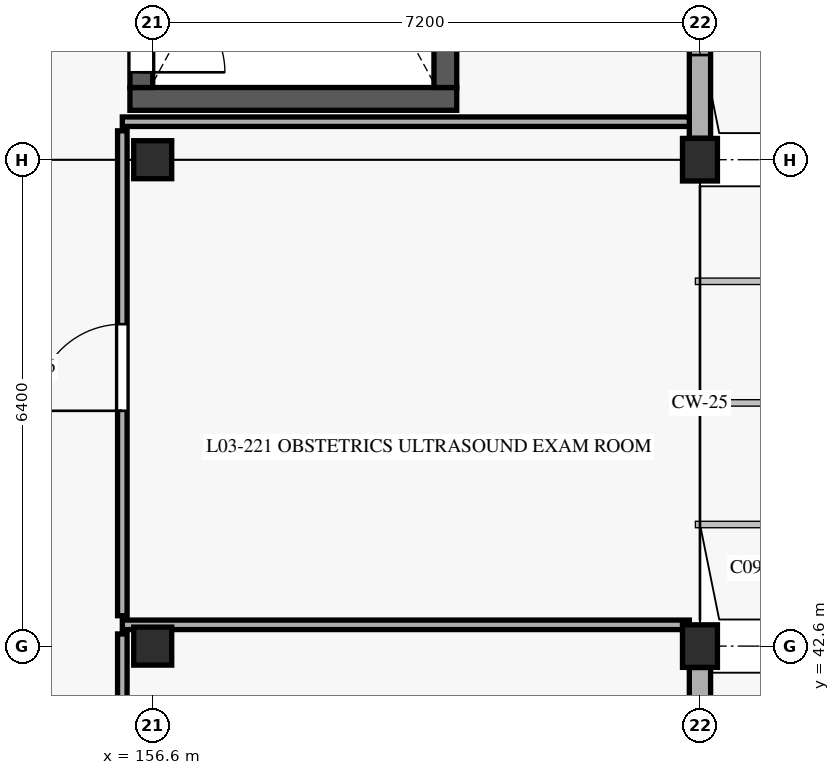
"""IFC4 building model, lengths in metres.
Left out: names, types, materials, properties, quantities, classifications, styles, units other than length and angle.
Written with IfcOpenShell. Run it as: python <this file> out.ifc"""

import sys

from ifc_helpers import new_model, si_unit, direction, frame, frame_2d, origin, origin_with_axes, origin_2d, place, context, subcontext, project, spatial, rectangle, extrude, element, fill, save


model = new_model("IFC4")
c1 = context("Model", 3, precision=1e-05, world=origin(), true_north=direction((0.0, 1.0)))
c2 = subcontext(c1, "Body", "Model", "MODEL_VIEW")
j1 = project(units=[si_unit("LENGTHUNIT", "METRE"), si_unit("PLANEANGLEUNIT", "RADIAN")], contexts=[c1])
p1 = place(None, origin())
s1 = spatial("IfcSite", under=j1, at=p1, CompositionType="ELEMENT")
p2 = place(p1, origin())
s2 = spatial("IfcBuilding", under=s1, at=p2, CompositionType="ELEMENT")
p3 = place(p2, frame((0.0, 0.0, 9.3)))
s3 = spatial("IfcBuildingStorey", under=s2, at=p3, CompositionType="ELEMENT", Elevation=9.3)
for number, where, z_axis, x_axis in (
    (1, (156.6, 42.6, 0.0), (0.0, 0.0, 1.0), (1.0, 0.0, 0.0)),
    (2, (156.6, 49.0, 0.0), (0.0, 0.0, 1.0), (1.0, 0.0, 0.0)),
):
    element("IfcColumn", number, at=place(p3, frame(where, z_axis=z_axis, x_axis=x_axis)), inside=s3, PredefinedType="COLUMN", context=c2, shape_type="SweptSolid", body=[
        extrude(rectangle(XDim=0.5, YDim=0.5, at=origin_2d()), origin(), (0.0, 0.0, 1.0), 4.2),
    ])
for number, where, z_axis, x_axis in (
    (3, (163.8, 42.6, 0.0), (0.0, 0.0, 1.0), (1.0, 0.0, 0.0)),
    (4, (163.8, 49.0, 0.0), (0.0, 0.0, 1.0), (1.0, 0.0, 0.0)),
):
    element("IfcColumn", number, at=place(p3, frame(where, z_axis=z_axis, x_axis=x_axis)), inside=s3, PredefinedType="COLUMN", context=c2, shape_type="SweptSolid", body=[
        extrude(rectangle(XDim=0.46, YDim=0.56, at=origin_2d()), origin(), (0.0, 0.0, 1.0), 4.2),
    ])
p4 = place(p3, frame((156.3, 49.8, 0.0), z_axis=(0.0, 0.0, 1.0), x_axis=(1.0, 0.0, 0.0)))
e5 = element("IfcWall", 5, at=p4, inside=s3, PredefinedType="SHEAR", context=c2, shape_type="SweptSolid", body=[
    extrude(rectangle(XDim=4.3, YDim=0.3, at=frame_2d((2.15, 0.0))), origin(), (0.0, 0.0, 1.0), 3.9),
])
p5 = place(p3, frame((156.45, 63.45, 0.0), z_axis=(0.0, 0.0, 1.0), x_axis=(0.0, -1.0, 0.0)))
e6 = element("IfcWall", 6, at=p5, inside=s3, PredefinedType="SHEAR", context=c2, shape_type="SweptSolid", body=[
    extrude(rectangle(XDim=13.5, YDim=0.3, at=frame_2d((6.75, 0.0))), origin(), (0.0, 0.0, 1.0), 3.9),
])
p6 = place(p5, frame((12.2, 0.0, 0.0)))
e7 = element("IfcOpeningElement", 7, at=p6, cuts=e6, PredefinedType="OPENING", context=c2, shape_type="SweptSolid", body=[
    extrude(rectangle(XDim=1.1, YDim=2.2, at=frame_2d((0.55, 1.1))), frame((0.0, 0.16, 0.0), z_axis=(0.0, -1.0, 0.0), x_axis=(1.0, 0.0, 0.0)), (0.0, 0.0, 1.0), 0.32),
])
p7 = place(p5, frame((4.475, 0.0, 0.0)))
e8 = element("IfcOpeningElement", 8, at=p7, cuts=e6, PredefinedType="OPENING", context=c2, shape_type="SweptSolid", body=[
    extrude(rectangle(XDim=1.15, YDim=2.2, at=frame_2d((0.575, 1.1))), frame((0.0, 0.16, 0.0), z_axis=(0.0, -1.0, 0.0), x_axis=(1.0, 0.0, 0.0)), (0.0, 0.0, 1.0), 0.32),
])
p8 = place(p5, frame((2.34, 0.0, 0.0)))
e9 = element("IfcOpeningElement", 9, at=p8, cuts=e6, PredefinedType="OPENING", context=c2, shape_type="SweptSolid", body=[
    extrude(rectangle(XDim=1.02, YDim=2.15, at=frame_2d((0.51, 1.075))), frame((0.0, 0.16, 0.0), z_axis=(0.0, -1.0, 0.0), x_axis=(1.0, 0.0, 0.0)), (0.0, 0.0, 1.0), 0.32),
])
p9 = place(p5, frame((0.44, 0.0, 0.0)))
e10 = element("IfcOpeningElement", 10, at=p9, cuts=e6, PredefinedType="OPENING", context=c2, shape_type="SweptSolid", body=[
    extrude(rectangle(XDim=1.02, YDim=2.15, at=frame_2d((0.51, 1.075))), frame((0.0, 0.16, 0.0), z_axis=(0.0, -1.0, 0.0), x_axis=(1.0, 0.0, 0.0)), (0.0, 0.0, 1.0), 0.32),
])
p10 = place(p3, frame((160.45, 49.95, 0.0), z_axis=(0.0, 0.0, 1.0), x_axis=(0.0, 1.0, 0.0)))
e11 = element("IfcWall", 11, at=p10, inside=s3, PredefinedType="SHEAR", context=c2, shape_type="SweptSolid", body=[
    extrude(rectangle(XDim=13.5, YDim=0.3, at=frame_2d((6.75, 0.0))), origin(), (0.0, 0.0, 1.0), 3.9),
])
p11 = place(p3, frame((163.8, 36.482, 0.0), z_axis=(0.0, 0.0, 1.0), x_axis=(0.0, 1.0, 0.0)))
e12 = element("IfcWall", 12, at=p11, inside=s3, PredefinedType="SOLIDWALL", context=c2, shape_type="SweptSolid", body=[
    extrude(rectangle(XDim=5.836, YDim=0.28, at=frame_2d((2.918, 0.0))), origin(), (0.0, 0.0, 1.0), 3.48),
])
p12 = place(p11, frame((1.295, 0.0, 0.88)))
e13 = element("IfcOpeningElement", 13, at=p12, cuts=e12, PredefinedType="OPENING", context=c2, shape_type="SweptSolid", body=[
    extrude(rectangle(XDim=1.3, YDim=1.7, at=frame_2d((0.65, 0.85))), frame((0.0, 0.15, 0.0), z_axis=(0.0, -1.0, 0.0), x_axis=(1.0, 0.0, 0.0)), (0.0, 0.0, 1.0), 0.3),
])
p13 = place(p11, frame((3.401, 0.0, 0.88)))
e14 = element("IfcOpeningElement", 14, at=p13, cuts=e12, PredefinedType="OPENING", context=c2, shape_type="SweptSolid", body=[
    extrude(rectangle(XDim=0.98, YDim=2.1, at=frame_2d((0.49, 1.05))), frame((0.0, 0.15, 0.0), z_axis=(0.0, -1.0, 0.0), x_axis=(1.0, 0.0, 0.0)), (0.0, 0.0, 1.0), 0.3),
])
p14 = place(p3, frame((163.8, 49.282, 0.0), z_axis=(0.0, 0.0, 1.0), x_axis=(0.0, 1.0, 0.0)))
e15 = element("IfcWall", 15, at=p14, inside=s3, PredefinedType="SOLIDWALL", context=c2, shape_type="SweptSolid", body=[
    extrude(rectangle(XDim=5.836, YDim=0.28, at=frame_2d((2.918, 0.0))), origin(), (0.0, 0.0, 1.0), 3.48),
])
p15 = place(p14, frame((1.095, 0.0, 0.88)))
e16 = element("IfcOpeningElement", 16, at=p15, cuts=e15, PredefinedType="OPENING", context=c2, shape_type="SweptSolid", body=[
    extrude(rectangle(XDim=1.7, YDim=1.7, at=frame_2d((0.85, 0.85))), frame((0.0, 0.15, 0.0), z_axis=(0.0, -1.0, 0.0), x_axis=(1.0, 0.0, 0.0)), (0.0, 0.0, 1.0), 0.3),
])
p16 = place(p14, frame((3.331, 0.0, 0.88)))
e17 = element("IfcOpeningElement", 17, at=p16, cuts=e15, PredefinedType="OPENING", context=c2, shape_type="SweptSolid", body=[
    extrude(rectangle(XDim=1.12, YDim=1.95, at=frame_2d((0.56, 0.975))), frame((0.0, 0.15, 0.0), z_axis=(0.0, -1.0, 0.0), x_axis=(1.0, 0.0, 0.0)), (0.0, 0.0, 1.0), 0.3),
])
p17 = place(p3, frame((156.2, 34.66, 0.0), z_axis=(0.0, 0.0, 1.0), x_axis=(0.0, 1.0, 0.0)))
e18 = element("IfcWall", 18, at=p17, inside=s3, PredefinedType="PARTITIONING", context=c2, shape_type="SweptSolid", body=[
    extrude(rectangle(XDim=8.1, YDim=0.125, at=frame_2d((4.05, 0.0))), origin(), (0.0, 0.0, 1.0), 3.895),
])
p18 = place(p17, frame((3.6, 0.0, 0.0)))
e19 = element("IfcOpeningElement", 19, at=p18, cuts=e18, PredefinedType="OPENING", context=c2, shape_type="SweptSolid", body=[
    extrude(rectangle(XDim=0.9, YDim=2.12, at=frame_2d((0.45, 1.06))), frame((0.0, 0.073, 0.0), z_axis=(0.0, -1.0, 0.0), x_axis=(1.0, 0.0, 0.0)), (0.0, 0.0, 1.0), 0.145),
])
p19 = place(p3, frame((156.2, 42.88, 0.0), z_axis=(0.0, 0.0, 1.0), x_axis=(1.0, 0.0, 0.0)))
e20 = element("IfcWall", 20, at=p19, inside=s3, PredefinedType="PARTITIONING", context=c2, shape_type="SweptSolid", body=[
    extrude(rectangle(XDim=7.46, YDim=0.125, at=frame_2d((3.73, 0.0))), origin(), (0.0, 0.0, 1.0), 3.475),
])
p20 = place(p3, frame((156.2, 43.0, 0.0), z_axis=(0.0, 0.0, 1.0), x_axis=(0.0, 1.0, 0.0)))
e21 = element("IfcWall", 21, at=p20, inside=s3, PredefinedType="PARTITIONING", context=c2, shape_type="SweptSolid", body=[
    extrude(rectangle(XDim=6.38, YDim=0.125, at=frame_2d((3.19, 0.0))), origin(), (0.0, 0.0, 1.0), 3.245),
])
p21 = place(p20, frame((2.696, 0.0, 0.0)))
e22 = element("IfcOpeningElement", 22, at=p21, cuts=e21, PredefinedType="OPENING", context=c2, shape_type="SweptSolid", body=[
    extrude(rectangle(XDim=1.14, YDim=2.22, at=frame_2d((0.57, 1.11))), frame((0.0, 0.073, 0.0), z_axis=(0.0, -1.0, 0.0), x_axis=(1.0, 0.0, 0.0)), (0.0, 0.0, 1.0), 0.145),
])
p22 = place(p3, frame((156.2, 49.5, 0.0), z_axis=(0.0, 0.0, 1.0), x_axis=(1.0, 0.0, 0.0)))
e23 = element("IfcWall", 23, at=p22, inside=s3, PredefinedType="PARTITIONING", context=c2, shape_type="SweptSolid", body=[
    extrude(rectangle(XDim=7.46, YDim=0.125, at=frame_2d((3.73, 0.0))), origin(), (0.0, 0.0, 1.0), 3.475),
])
p23 = place(p6, origin_with_axes())
e24 = element("IfcDoor", 24, at=p23, inside=s3, OperationType="SINGLE_SWING_RIGHT", PredefinedType="DOOR", context=c2, shape_type="SweptSolid", body=[
    extrude(rectangle(XDim=1.1, YDim=2.2, at=frame_2d((0.55, 1.1))), frame((0.0, 0.025, 0.0), z_axis=(0.0, -1.0, 0.0), x_axis=(1.0, 0.0, 0.0)), (0.0, 0.0, 1.0), 0.05),
])
fill(e7, e24)
p24 = place(p15, origin_with_axes())
e25 = element("IfcWindow", 25, at=p24, inside=s3, PartitioningType="SINGLE_PANEL", PredefinedType="WINDOW", context=c2, shape_type="SweptSolid", body=[
    extrude(rectangle(XDim=1.7, YDim=1.7, at=frame_2d((0.85, 0.85))), frame((0.0, 0.03, 0.0), z_axis=(0.0, -1.0, 0.0), x_axis=(1.0, 0.0, 0.0)), (0.0, 0.0, 1.0), 0.06),
])
fill(e16, e25)
p25 = place(p21, frame((1.14, 0.0, 0.0), z_axis=(0.0, 0.0, 1.0), x_axis=(-1.0, 0.0, 0.0)))
e26 = element("IfcDoor", 26, at=p25, inside=s3, OperationType="SINGLE_SWING_RIGHT", PredefinedType="DOOR", context=c2, shape_type="SweptSolid", body=[
    extrude(rectangle(XDim=1.14, YDim=2.22, at=frame_2d((0.57, 1.11))), frame((0.0, 0.025, 0.0), z_axis=(0.0, -1.0, 0.0), x_axis=(1.0, 0.0, 0.0)), (0.0, 0.0, 1.0), 0.05),
])
fill(e22, e26)
save(model, sys.argv[1])
